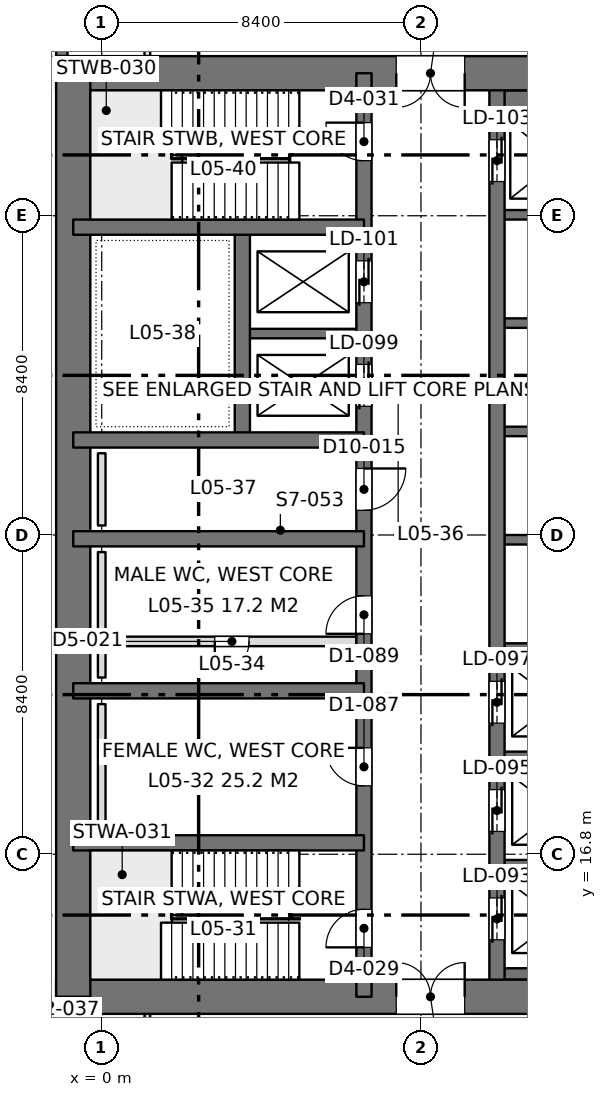
"""IFC4 building model, lengths in metres.
Left out: names, types, materials, properties, quantities, classifications, styles, units other than length and angle.
Written with IfcOpenShell. Run it as: python <this file> out.ifc"""

import sys

from ifc_helpers import new_model, si_unit, direction, frame, frame_2d, origin, place, context, subcontext, project, spatial, rectangle, extrude, element, fill, save


model = new_model("IFC4")
c1 = context("Model", 3, precision=1e-05, world=origin(), true_north=direction((0.0, 1.0)))
c2 = subcontext(c1, "Body", "Model", "MODEL_VIEW")
j1 = project(units=[si_unit("LENGTHUNIT", "METRE"), si_unit("PLANEANGLEUNIT", "RADIAN")], contexts=[c1])
p1 = place(None, origin())
s1 = spatial("IfcSite", under=j1, at=p1, CompositionType="ELEMENT")
p2 = place(p1, origin())
s2 = spatial("IfcBuilding", under=s1, at=p2, CompositionType="ELEMENT")
p3 = place(p2, frame((0.0, 0.0, 23.4)))
s3 = spatial("IfcBuildingStorey", under=s2, at=p3, CompositionType="ELEMENT", Elevation=23.4)
p4 = place(p3, frame((-1.2, 13.05, 0.0), z_axis=(0.0, 0.0, 1.0), x_axis=(1.0, 0.0, 0.0)))
e1 = element("IfcWall", 1, at=p4, inside=s3, PredefinedType="SHEAR", context=c2, shape_type="SweptSolid", body=[
    extrude(rectangle(XDim=18.0, YDim=0.9, at=frame_2d((9.0, 0.0))), origin(), (0.0, 0.0, 1.0), 4.5),
])
p5 = place(p4, frame((8.95, 0.0, 0.0)))
e2 = element("IfcOpeningElement", 2, at=p5, cuts=e1, PredefinedType="OPENING", context=c2, shape_type="SweptSolid", body=[
    extrude(rectangle(XDim=1.8, YDim=2.4, at=frame_2d((0.9, 1.2))), frame((0.0, 0.46, 0.0), z_axis=(0.0, -1.0, 0.0), x_axis=(1.0, 0.0, 0.0)), (0.0, 0.0, 1.0), 0.92),
])
p6 = place(p3, frame((-1.2, 37.35, 0.0), z_axis=(0.0, 0.0, 1.0), x_axis=(1.0, 0.0, 0.0)))
e3 = element("IfcWall", 3, at=p6, inside=s3, PredefinedType="SHEAR", context=c2, shape_type="SweptSolid", body=[
    extrude(rectangle(XDim=18.0, YDim=0.9, at=frame_2d((9.0, 0.0))), origin(), (0.0, 0.0, 1.0), 4.5),
])
p7 = place(p6, frame((8.95, 0.0, 0.0)))
e4 = element("IfcOpeningElement", 4, at=p7, cuts=e3, PredefinedType="OPENING", context=c2, shape_type="SweptSolid", body=[
    extrude(rectangle(XDim=1.8, YDim=2.4, at=frame_2d((0.9, 1.2))), frame((0.0, 0.46, 0.0), z_axis=(0.0, -1.0, 0.0), x_axis=(1.0, 0.0, 0.0)), (0.0, 0.0, 1.0), 0.92),
])
p8 = place(p3, frame((-0.75, 13.05, 0.0), z_axis=(0.0, 0.0, 1.0), x_axis=(0.0, 1.0, 0.0)))
e5 = element("IfcWall", 5, at=p8, inside=s3, PredefinedType="SHEAR", context=c2, shape_type="SweptSolid", body=[
    extrude(rectangle(XDim=24.3, YDim=0.9, at=frame_2d((12.15, 0.0))), origin(), (0.0, 0.0, 1.0), 4.5),
])
p9 = place(p3, frame((6.9, 13.05, 0.0), z_axis=(0.0, 0.0, 1.0), x_axis=(0.0, 1.0, 0.0)))
e6 = element("IfcWall", 6, at=p9, inside=s3, PredefinedType="SHEAR", context=c2, shape_type="SweptSolid", body=[
    extrude(rectangle(XDim=24.3, YDim=0.4, at=frame_2d((12.15, 0.0))), origin(), (0.0, 0.0, 1.0), 4.5),
])
p10 = place(p9, frame((1.3, 0.0, 0.0)))
e7 = element("IfcOpeningElement", 7, at=p10, cuts=e6, PredefinedType="OPENING", context=c2, shape_type="SweptSolid", body=[
    extrude(rectangle(XDim=1.0, YDim=2.2, at=frame_2d((0.5, 1.1))), frame((0.0, 0.21, 0.0), z_axis=(0.0, -1.0, 0.0), x_axis=(1.0, 0.0, 0.0)), (0.0, 0.0, 1.0), 0.42),
])
p11 = place(p9, frame((22.0, 0.0, 0.0)))
e8 = element("IfcOpeningElement", 8, at=p11, cuts=e6, PredefinedType="OPENING", context=c2, shape_type="SweptSolid", body=[
    extrude(rectangle(XDim=1.0, YDim=2.2, at=frame_2d((0.5, 1.1))), frame((0.0, 0.21, 0.0), z_axis=(0.0, -1.0, 0.0), x_axis=(1.0, 0.0, 0.0)), (0.0, 0.0, 1.0), 0.42),
])
p12 = place(p9, frame((5.55, 0.0, 0.0)))
e9 = element("IfcOpeningElement", 9, at=p12, cuts=e6, PredefinedType="OPENING", context=c2, shape_type="SweptSolid", body=[
    extrude(rectangle(XDim=1.0, YDim=2.2, at=frame_2d((0.5, 1.1))), frame((0.0, 0.21, 0.0), z_axis=(0.0, -1.0, 0.0), x_axis=(1.0, 0.0, 0.0)), (0.0, 0.0, 1.0), 0.42),
])
p13 = place(p9, frame((9.55, 0.0, 0.0)))
e10 = element("IfcOpeningElement", 10, at=p13, cuts=e6, PredefinedType="OPENING", context=c2, shape_type="SweptSolid", body=[
    extrude(rectangle(XDim=1.0, YDim=2.2, at=frame_2d((0.5, 1.1))), frame((0.0, 0.21, 0.0), z_axis=(0.0, -1.0, 0.0), x_axis=(1.0, 0.0, 0.0)), (0.0, 0.0, 1.0), 0.42),
])
p14 = place(p9, frame((12.8, 0.0, 0.0)))
e11 = element("IfcOpeningElement", 11, at=p14, cuts=e6, PredefinedType="OPENING", context=c2, shape_type="SweptSolid", body=[
    extrude(rectangle(XDim=1.1, YDim=2.2, at=frame_2d((0.55, 1.1))), frame((0.0, 0.21, 0.0), z_axis=(0.0, -1.0, 0.0), x_axis=(1.0, 0.0, 0.0)), (0.0, 0.0, 1.0), 0.42),
])
p15 = place(p9, frame((15.538, 0.0, 0.0)))
e12 = element("IfcOpeningElement", 12, at=p15, cuts=e6, PredefinedType="OPENING", context=c2, shape_type="SweptSolid", body=[
    extrude(rectangle(XDim=1.1, YDim=2.2, at=frame_2d((0.55, 1.1))), frame((0.0, 0.21, 0.0), z_axis=(0.0, -1.0, 0.0), x_axis=(1.0, 0.0, 0.0)), (0.0, 0.0, 1.0), 0.42),
])
p16 = place(p9, frame((18.262, 0.0, 0.0)))
e13 = element("IfcOpeningElement", 13, at=p16, cuts=e6, PredefinedType="OPENING", context=c2, shape_type="SweptSolid", body=[
    extrude(rectangle(XDim=1.1, YDim=2.2, at=frame_2d((0.55, 1.1))), frame((0.0, 0.21, 0.0), z_axis=(0.0, -1.0, 0.0), x_axis=(1.0, 0.0, 0.0)), (0.0, 0.0, 1.0), 0.42),
])
p17 = place(p3, frame((10.4, 13.05, 0.0), z_axis=(0.0, 0.0, 1.0), x_axis=(0.0, 1.0, 0.0)))
e14 = element("IfcWall", 14, at=p17, inside=s3, PredefinedType="SHEAR", context=c2, shape_type="SweptSolid", body=[
    extrude(rectangle(XDim=24.3, YDim=0.4, at=frame_2d((12.15, 0.0))), origin(), (0.0, 0.0, 1.0), 4.5),
])
p18 = place(p17, frame((1.5, 0.0, 0.0)))
e15 = element("IfcOpeningElement", 15, at=p18, cuts=e14, PredefinedType="OPENING", context=c2, shape_type="SweptSolid", body=[
    extrude(rectangle(XDim=1.1, YDim=2.2, at=frame_2d((0.55, 1.1))), frame((0.0, 0.21, 0.0), z_axis=(0.0, -1.0, 0.0), x_axis=(1.0, 0.0, 0.0)), (0.0, 0.0, 1.0), 0.42),
])
p19 = place(p17, frame((4.35, 0.0, 0.0)))
e16 = element("IfcOpeningElement", 16, at=p19, cuts=e14, PredefinedType="OPENING", context=c2, shape_type="SweptSolid", body=[
    extrude(rectangle(XDim=1.1, YDim=2.2, at=frame_2d((0.55, 1.1))), frame((0.0, 0.21, 0.0), z_axis=(0.0, -1.0, 0.0), x_axis=(1.0, 0.0, 0.0)), (0.0, 0.0, 1.0), 0.42),
])
p20 = place(p17, frame((7.2, 0.0, 0.0)))
e17 = element("IfcOpeningElement", 17, at=p20, cuts=e14, PredefinedType="OPENING", context=c2, shape_type="SweptSolid", body=[
    extrude(rectangle(XDim=1.1, YDim=2.2, at=frame_2d((0.55, 1.1))), frame((0.0, 0.21, 0.0), z_axis=(0.0, -1.0, 0.0), x_axis=(1.0, 0.0, 0.0)), (0.0, 0.0, 1.0), 0.42),
])
p21 = place(p17, frame((21.45, 0.0, 0.0)))
e18 = element("IfcOpeningElement", 18, at=p21, cuts=e14, PredefinedType="OPENING", context=c2, shape_type="SweptSolid", body=[
    extrude(rectangle(XDim=1.1, YDim=2.2, at=frame_2d((0.55, 1.1))), frame((0.0, 0.21, 0.0), z_axis=(0.0, -1.0, 0.0), x_axis=(1.0, 0.0, 0.0)), (0.0, 0.0, 1.0), 0.42),
])
for number, where, z_axis, x_axis in (
    (19, (-0.75, 17.1, 0.0), (0.0, 0.0, 1.0), (1.0, 0.0, 0.0)),
    (20, (-0.75, 21.1, 0.0), (0.0, 0.0, 1.0), (1.0, 0.0, 0.0)),
    (21, (-0.75, 25.1, 0.0), (0.0, 0.0, 1.0), (1.0, 0.0, 0.0)),
    (22, (-0.75, 27.7, 0.0), (0.0, 0.0, 1.0), (1.0, 0.0, 0.0)),
    (23, (-0.75, 33.3, 0.0), (0.0, 0.0, 1.0), (1.0, 0.0, 0.0)),
):
    element("IfcWall", number, at=place(p3, frame(where, z_axis=z_axis, x_axis=x_axis)), inside=s3, PredefinedType="SHEAR", context=c2, shape_type="SweptSolid", body=[
        extrude(rectangle(XDim=7.65, YDim=0.4, at=frame_2d((3.825, 0.0))), origin(), (0.0, 0.0, 1.0), 4.5),
    ])
p22 = place(p3, frame((3.7, 27.7, 0.0), z_axis=(0.0, 0.0, 1.0), x_axis=(0.0, 1.0, 0.0)))
e24 = element("IfcWall", 24, at=p22, inside=s3, PredefinedType="SHEAR", context=c2, shape_type="SweptSolid", body=[
    extrude(rectangle(XDim=5.6, YDim=0.4, at=frame_2d((2.8, 0.0))), origin(), (0.0, 0.0, 1.0), 4.5),
])
p23 = place(p3, frame((3.7, 30.5, 0.0), z_axis=(0.0, 0.0, 1.0), x_axis=(1.0, 0.0, 0.0)))
e25 = element("IfcWall", 25, at=p23, inside=s3, PredefinedType="SHEAR", context=c2, shape_type="SweptSolid", body=[
    extrude(rectangle(XDim=3.2, YDim=0.25, at=frame_2d((1.6, 0.0))), origin(), (0.0, 0.0, 1.0), 4.5),
])
p24 = place(p3, frame((10.4, 13.65, 0.0), z_axis=(0.0, 0.0, 1.0), x_axis=(1.0, 0.0, 0.0)))
e26 = element("IfcWall", 26, at=p24, inside=s3, PredefinedType="SHEAR", context=c2, shape_type="SweptSolid", body=[
    extrude(rectangle(XDim=3.2, YDim=0.3, at=frame_2d((1.6, 0.0))), origin(), (0.0, 0.0, 1.0), 4.5),
])
for number, where, z_axis, x_axis in (
    (27, (10.4, 16.525, 0.0), (0.0, 0.0, 1.0), (1.0, 0.0, 0.0)),
    (28, (10.4, 19.375, 0.0), (0.0, 0.0, 1.0), (1.0, 0.0, 0.0)),
    (29, (10.4, 22.225, 0.0), (0.0, 0.0, 1.0), (1.0, 0.0, 0.0)),
    (30, (10.4, 25.075, 0.0), (0.0, 0.0, 1.0), (1.0, 0.0, 0.0)),
    (31, (10.4, 27.925, 0.0), (0.0, 0.0, 1.0), (1.0, 0.0, 0.0)),
    (32, (10.4, 30.775, 0.0), (0.0, 0.0, 1.0), (1.0, 0.0, 0.0)),
    (33, (10.4, 33.625, 0.0), (0.0, 0.0, 1.0), (1.0, 0.0, 0.0)),
):
    element("IfcWall", number, at=place(p3, frame(where, z_axis=z_axis, x_axis=x_axis)), inside=s3, PredefinedType="SHEAR", context=c2, shape_type="SweptSolid", body=[
        extrude(rectangle(XDim=3.2, YDim=0.25, at=frame_2d((1.6, 0.0))), origin(), (0.0, 0.0, 1.0), 4.5),
    ])
p25 = place(p3, frame((10.4, 36.625, 0.0), z_axis=(0.0, 0.0, 1.0), x_axis=(1.0, 0.0, 0.0)))
e34 = element("IfcWall", 34, at=p25, inside=s3, PredefinedType="SHEAR", context=c2, shape_type="SweptSolid", body=[
    extrude(rectangle(XDim=3.2, YDim=0.55, at=frame_2d((1.6, 0.0))), origin(), (0.0, 0.0, 1.0), 4.5),
])
p26 = place(p3, frame((-1.05, 8.4, 0.0), z_axis=(0.0, 0.0, 1.0), x_axis=(0.0, 1.0, 0.0)))
e35 = element("IfcWall", 35, at=p26, inside=s3, PredefinedType="SOLIDWALL", context=c2, shape_type="SweptSolid", body=[
    extrude(rectangle(XDim=4.2, YDim=0.3, at=frame_2d((2.1, 0.0))), origin(), (0.0, 0.0, 1.0), 4.34),
])
p27 = place(p26, frame((0.9, 0.0, 0.9)))
e36 = element("IfcOpeningElement", 36, at=p27, cuts=e35, PredefinedType="OPENING", context=c2, shape_type="SweptSolid", body=[
    extrude(rectangle(XDim=2.4, YDim=1.9, at=frame_2d((1.2, 0.95))), frame((0.0, 0.16, 0.0), z_axis=(0.0, -1.0, 0.0), x_axis=(1.0, 0.0, 0.0)), (0.0, 0.0, 1.0), 0.32),
])
p28 = place(p3, frame((-1.05, 37.8, 0.0), z_axis=(0.0, 0.0, 1.0), x_axis=(0.0, 1.0, 0.0)))
e37 = element("IfcWall", 37, at=p28, inside=s3, PredefinedType="SOLIDWALL", context=c2, shape_type="SweptSolid", body=[
    extrude(rectangle(XDim=4.2, YDim=0.3, at=frame_2d((2.1, 0.0))), origin(), (0.0, 0.0, 1.0), 4.34),
])
p29 = place(p28, frame((0.9, 0.0, 0.9)))
e38 = element("IfcOpeningElement", 38, at=p29, cuts=e37, PredefinedType="OPENING", context=c2, shape_type="SweptSolid", body=[
    extrude(rectangle(XDim=2.4, YDim=1.9, at=frame_2d((1.2, 0.95))), frame((0.0, 0.16, 0.0), z_axis=(0.0, -1.0, 0.0), x_axis=(1.0, 0.0, 0.0)), (0.0, 0.0, 1.0), 0.32),
])
p30 = place(p3, frame((1.2, 10.8, 0.0), z_axis=(0.0, 0.0, 1.0), x_axis=(0.0, 1.0, 0.0)))
e39 = element("IfcWall", 39, at=p30, inside=s3, PredefinedType="PARTITIONING", context=c2, shape_type="SweptSolid", body=[
    extrude(rectangle(XDim=1.802, YDim=0.15, at=frame_2d((0.901, 0.0))), origin(), (0.0, 0.0, 1.0), 4.34),
])
p31 = place(p3, frame((1.2, 37.8, 0.0), z_axis=(0.0, 0.0, 1.0), x_axis=(0.0, 1.0, 0.0)))
e40 = element("IfcWall", 40, at=p31, inside=s3, PredefinedType="PARTITIONING", context=c2, shape_type="SweptSolid", body=[
    extrude(rectangle(XDim=1.8, YDim=0.15, at=frame_2d((0.9, 0.0))), origin(), (0.0, 0.0, 1.0), 4.34),
])
p32 = place(p3, frame((0.1, 22.4, 0.0), z_axis=(0.0, 0.0, 1.0), x_axis=(1.0, 0.0, 0.0)))
e41 = element("IfcWall", 41, at=p32, inside=s3, PredefinedType="PARTITIONING", context=c2, shape_type="SweptSolid", body=[
    extrude(rectangle(XDim=6.6, YDim=0.25, at=frame_2d((3.3, 0.0))), origin(), (0.0, 0.0, 1.0), 4.3),
])
p33 = place(p32, frame((2.875, 0.0, 0.0)))
e42 = element("IfcOpeningElement", 42, at=p33, cuts=e41, PredefinedType="OPENING", context=c2, shape_type="SweptSolid", body=[
    extrude(rectangle(XDim=0.9, YDim=2.2, at=frame_2d((0.45, 1.1))), frame((0.0, 0.135, 0.0), z_axis=(0.0, -1.0, 0.0), x_axis=(1.0, 0.0, 0.0)), (0.0, 0.0, 1.0), 0.27),
])
for number, where, z_axis, x_axis in (
    (43, (0.0, 17.45, 0.0), (0.0, 0.0, 1.0), (0.0, 1.0, 0.0)),
    (44, (0.0, 21.45, 0.0), (0.0, 0.0, 1.0), (0.0, 1.0, 0.0)),
):
    element("IfcWall", number, at=place(p3, frame(where, z_axis=z_axis, x_axis=x_axis)), inside=s3, PredefinedType="PLUMBINGWALL", context=c2, shape_type="SweptSolid", body=[
        extrude(rectangle(XDim=3.3, YDim=0.2, at=frame_2d((1.65, 0.0))), origin(), (0.0, 0.0, 1.0), 1.2),
    ])
p34 = place(p3, frame((0.0, 25.45, 0.0), z_axis=(0.0, 0.0, 1.0), x_axis=(0.0, 1.0, 0.0)))
e45 = element("IfcWall", 45, at=p34, inside=s3, PredefinedType="PLUMBINGWALL", context=c2, shape_type="SweptSolid", body=[
    extrude(rectangle(XDim=1.9, YDim=0.2, at=frame_2d((0.95, 0.0))), origin(), (0.0, 0.0, 1.0), 1.2),
])
p35 = place(p5, origin())
e46 = element("IfcDoor", 46, at=p35, inside=s3, OperationType="DOUBLE_DOOR_SINGLE_SWING", PredefinedType="DOOR", context=c2, shape_type="SweptSolid", body=[
    extrude(rectangle(XDim=1.8, YDim=2.4, at=frame_2d((0.9, 1.2))), frame((0.0, 0.025, 0.0), z_axis=(0.0, -1.0, 0.0), x_axis=(1.0, 0.0, 0.0)), (0.0, 0.0, 1.0), 0.05),
])
fill(e2, e46)
p36 = place(p7, frame((1.8, 0.0, 0.0), z_axis=(0.0, 0.0, 1.0), x_axis=(-1.0, 0.0, 0.0)))
e47 = element("IfcDoor", 47, at=p36, inside=s3, OperationType="DOUBLE_DOOR_SINGLE_SWING", PredefinedType="DOOR", context=c2, shape_type="SweptSolid", body=[
    extrude(rectangle(XDim=1.8, YDim=2.4, at=frame_2d((0.9, 1.2))), frame((0.0, 0.025, 0.0), z_axis=(0.0, -1.0, 0.0), x_axis=(1.0, 0.0, 0.0)), (0.0, 0.0, 1.0), 0.05),
])
fill(e4, e47)
p37 = place(p10, origin())
e48 = element("IfcDoor", 48, at=p37, inside=s3, OperationType="SINGLE_SWING_LEFT", PredefinedType="DOOR", context=c2, shape_type="SweptSolid", body=[
    extrude(rectangle(XDim=1.0, YDim=2.2, at=frame_2d((0.5, 1.1))), frame((0.0, 0.025, 0.0), z_axis=(0.0, -1.0, 0.0), x_axis=(1.0, 0.0, 0.0)), (0.0, 0.0, 1.0), 0.05),
])
fill(e7, e48)
p38 = place(p11, origin())
e49 = element("IfcDoor", 49, at=p38, inside=s3, OperationType="SINGLE_SWING_RIGHT", PredefinedType="DOOR", context=c2, shape_type="SweptSolid", body=[
    extrude(rectangle(XDim=1.0, YDim=2.2, at=frame_2d((0.5, 1.1))), frame((0.0, 0.025, 0.0), z_axis=(0.0, -1.0, 0.0), x_axis=(1.0, 0.0, 0.0)), (0.0, 0.0, 1.0), 0.05),
])
fill(e8, e49)
p39 = place(p12, origin())
e50 = element("IfcDoor", 50, at=p39, inside=s3, OperationType="SINGLE_SWING_RIGHT", PredefinedType="DOOR", context=c2, shape_type="SweptSolid", body=[
    extrude(rectangle(XDim=1.0, YDim=2.2, at=frame_2d((0.5, 1.1))), frame((0.0, 0.025, 0.0), z_axis=(0.0, -1.0, 0.0), x_axis=(1.0, 0.0, 0.0)), (0.0, 0.0, 1.0), 0.05),
])
fill(e9, e50)
p40 = place(p13, origin())
e51 = element("IfcDoor", 51, at=p40, inside=s3, OperationType="SINGLE_SWING_LEFT", PredefinedType="DOOR", context=c2, shape_type="SweptSolid", body=[
    extrude(rectangle(XDim=1.0, YDim=2.2, at=frame_2d((0.5, 1.1))), frame((0.0, 0.025, 0.0), z_axis=(0.0, -1.0, 0.0), x_axis=(1.0, 0.0, 0.0)), (0.0, 0.0, 1.0), 0.05),
])
fill(e10, e51)
p41 = place(p14, frame((1.1, 0.0, 0.0), z_axis=(0.0, 0.0, 1.0), x_axis=(-1.0, 0.0, 0.0)))
e52 = element("IfcDoor", 52, at=p41, inside=s3, OperationType="SINGLE_SWING_LEFT", PredefinedType="DOOR", context=c2, shape_type="SweptSolid", body=[
    extrude(rectangle(XDim=1.1, YDim=2.2, at=frame_2d((0.55, 1.1))), frame((0.0, 0.025, 0.0), z_axis=(0.0, -1.0, 0.0), x_axis=(1.0, 0.0, 0.0)), (0.0, 0.0, 1.0), 0.05),
])
fill(e11, e52)
p42 = place(p18, origin())
e53 = element("IfcDoor", 53, at=p42, inside=s3, OperationType="DOUBLE_DOOR_SLIDING", PredefinedType="DOOR", context=c2, shape_type="SweptSolid", body=[
    extrude(rectangle(XDim=1.1, YDim=2.2, at=frame_2d((0.55, 1.1))), frame((0.0, 0.025, 0.0), z_axis=(0.0, -1.0, 0.0), x_axis=(1.0, 0.0, 0.0)), (0.0, 0.0, 1.0), 0.05),
])
fill(e15, e53)
p43 = place(p19, origin())
e54 = element("IfcDoor", 54, at=p43, inside=s3, OperationType="DOUBLE_DOOR_SLIDING", PredefinedType="DOOR", context=c2, shape_type="SweptSolid", body=[
    extrude(rectangle(XDim=1.1, YDim=2.2, at=frame_2d((0.55, 1.1))), frame((0.0, 0.025, 0.0), z_axis=(0.0, -1.0, 0.0), x_axis=(1.0, 0.0, 0.0)), (0.0, 0.0, 1.0), 0.05),
])
fill(e16, e54)
p44 = place(p20, origin())
e55 = element("IfcDoor", 55, at=p44, inside=s3, OperationType="DOUBLE_DOOR_SLIDING", PredefinedType="DOOR", context=c2, shape_type="SweptSolid", body=[
    extrude(rectangle(XDim=1.1, YDim=2.2, at=frame_2d((0.55, 1.1))), frame((0.0, 0.025, 0.0), z_axis=(0.0, -1.0, 0.0), x_axis=(1.0, 0.0, 0.0)), (0.0, 0.0, 1.0), 0.05),
])
fill(e17, e55)
p45 = place(p21, origin())
e56 = element("IfcDoor", 56, at=p45, inside=s3, OperationType="DOUBLE_DOOR_SLIDING", PredefinedType="DOOR", context=c2, shape_type="SweptSolid", body=[
    extrude(rectangle(XDim=1.1, YDim=2.2, at=frame_2d((0.55, 1.1))), frame((0.0, 0.025, 0.0), z_axis=(0.0, -1.0, 0.0), x_axis=(1.0, 0.0, 0.0)), (0.0, 0.0, 1.0), 0.05),
])
fill(e18, e56)
p46 = place(p15, origin())
e57 = element("IfcDoor", 57, at=p46, inside=s3, OperationType="DOUBLE_DOOR_SLIDING", PredefinedType="DOOR", context=c2, shape_type="SweptSolid", body=[
    extrude(rectangle(XDim=1.1, YDim=2.2, at=frame_2d((0.55, 1.1))), frame((0.0, 0.025, 0.0), z_axis=(0.0, -1.0, 0.0), x_axis=(1.0, 0.0, 0.0)), (0.0, 0.0, 1.0), 0.05),
])
fill(e12, e57)
p47 = place(p16, origin())
e58 = element("IfcDoor", 58, at=p47, inside=s3, OperationType="DOUBLE_DOOR_SLIDING", PredefinedType="DOOR", context=c2, shape_type="SweptSolid", body=[
    extrude(rectangle(XDim=1.1, YDim=2.2, at=frame_2d((0.55, 1.1))), frame((0.0, 0.025, 0.0), z_axis=(0.0, -1.0, 0.0), x_axis=(1.0, 0.0, 0.0)), (0.0, 0.0, 1.0), 0.05),
])
fill(e13, e58)
p48 = place(p33, frame((0.9, 0.0, 0.0), z_axis=(0.0, 0.0, 1.0), x_axis=(-1.0, 0.0, 0.0)))
e59 = element("IfcDoor", 59, at=p48, inside=s3, OperationType="SINGLE_SWING_RIGHT", PredefinedType="DOOR", context=c2, shape_type="SweptSolid", body=[
    extrude(rectangle(XDim=0.9, YDim=2.2, at=frame_2d((0.45, 1.1))), frame((0.0, 0.025, 0.0), z_axis=(0.0, -1.0, 0.0), x_axis=(1.0, 0.0, 0.0)), (0.0, 0.0, 1.0), 0.05),
])
fill(e42, e59)
save(model, sys.argv[1])
